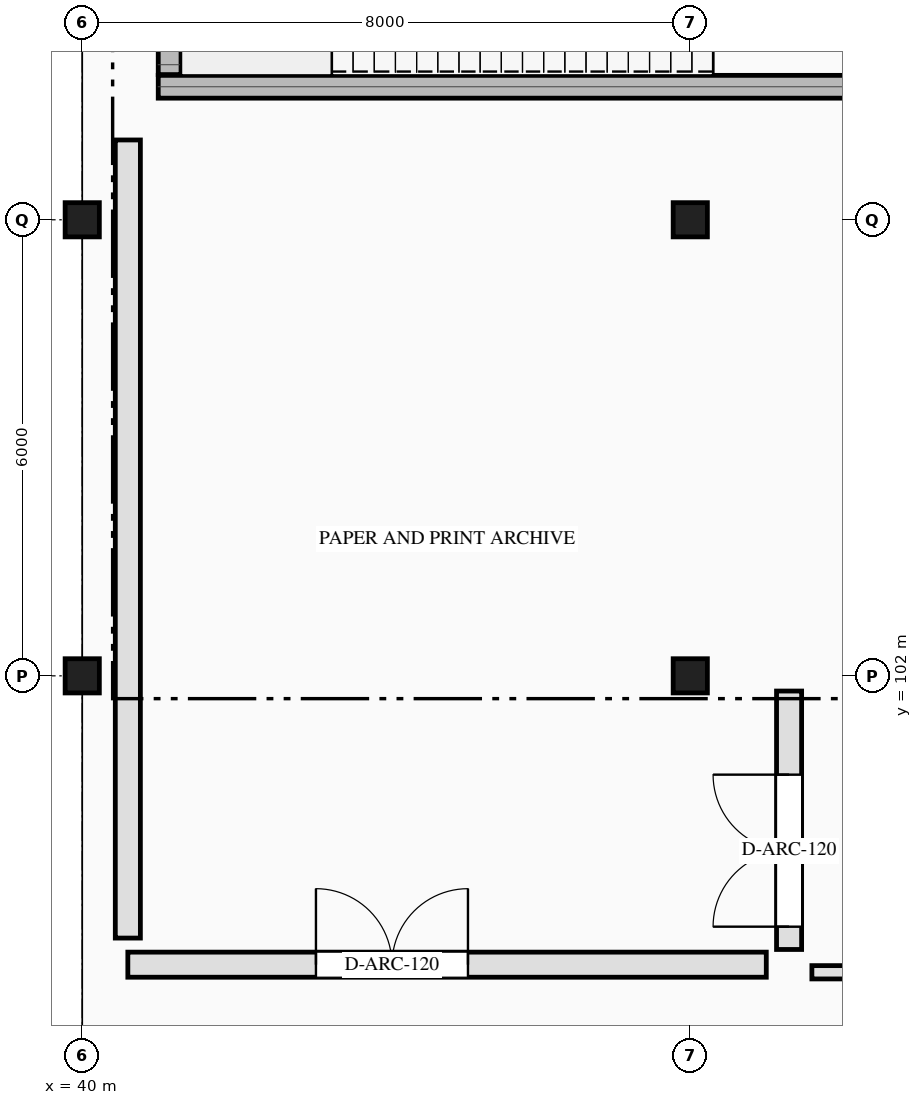
"""IFC4 building model, lengths in metres.
Left out: names, types, materials, properties, quantities, classifications, styles, units other than length and angle.
Written with IfcOpenShell. Run it as: python <this file> out.ifc"""

import sys

from ifc_helpers import new_model, si_unit, direction, frame, frame_2d, origin, origin_2d, place, context, subcontext, project, spatial, rectangle, extrude, element, fill, save


model = new_model("IFC4")
c1 = context("Model", 3, precision=1e-05, world=origin(), true_north=direction((0.0, 1.0)))
c2 = subcontext(c1, "Body", "Model", "MODEL_VIEW")
j1 = project(units=[si_unit("LENGTHUNIT", "METRE"), si_unit("PLANEANGLEUNIT", "RADIAN")], contexts=[c1])
p1 = place(None, origin())
s1 = spatial("IfcSite", under=j1, at=p1, CompositionType="ELEMENT")
p2 = place(p1, origin())
s2 = spatial("IfcBuilding", under=s1, at=p2, CompositionType="ELEMENT")
p3 = place(p2, frame((0.0, 0.0, -5.4)))
s3 = spatial("IfcBuildingStorey", under=s2, at=p3, CompositionType="ELEMENT", Elevation=-5.4)
p4 = place(p3, frame((41.0, 109.75, -0.4), z_axis=(0.0, 0.0, 1.0), x_axis=(1.0, 0.0, 0.0)))
e1 = element("IfcWall", 1, at=p4, inside=s3, PredefinedType="SHEAR", context=c2, shape_type="SweptSolid", body=[
    extrude(rectangle(XDim=10.0, YDim=0.3, at=frame_2d((5.0, 0.0))), origin(), (0.0, 0.0, 1.0), 5.8),
])
p5 = place(p3, frame((41.15, 109.91, -0.4), z_axis=(0.0, 0.0, 1.0), x_axis=(0.0, 1.0, 0.0)))
e2 = element("IfcWall", 2, at=p5, inside=s3, PredefinedType="SHEAR", context=c2, shape_type="SweptSolid", body=[
    extrude(rectangle(XDim=3.78, YDim=0.3, at=frame_2d((1.89, 0.0))), origin(), (0.0, 0.0, 1.0), 5.8),
])
for number, where, z_axis, x_axis in (
    (3, (40.0, 102.0, -0.4), (0.0, 0.0, 1.0), (1.0, 0.0, 0.0)),
    (4, (40.0, 108.0, -0.4), (0.0, 0.0, 1.0), (1.0, 0.0, 0.0)),
    (5, (48.0, 102.0, -0.4), (0.0, 0.0, 1.0), (1.0, 0.0, 0.0)),
    (6, (48.0, 108.0, -0.4), (0.0, 0.0, 1.0), (1.0, 0.0, 0.0)),
):
    element("IfcColumn", number, at=place(p3, frame(where, z_axis=z_axis, x_axis=x_axis)), inside=s3, PredefinedType="COLUMN", context=c2, shape_type="SweptSolid", body=[
        extrude(rectangle(XDim=0.45, YDim=0.45, at=origin_2d()), origin(), (0.0, 0.0, 1.0), 5.8),
    ])
p6 = place(p3, frame((49.6, 98.1, 0.0), z_axis=(0.0, 0.0, 1.0), x_axis=(1.0, 0.0, 0.0)))
e7 = element("IfcWall", 7, at=p6, inside=s3, PredefinedType="PARTITIONING", context=c2, shape_type="SweptSolid", body=[
    extrude(rectangle(XDim=5.9, YDim=0.175, at=frame_2d((2.95, 0.0))), origin(), (0.0, 0.0, 1.0), 5.16),
])
p7 = place(p6, frame((1.78, 0.0, 0.0)))
e8 = element("IfcOpeningElement", 8, at=p7, cuts=e7, PredefinedType="OPENING", context=c2, shape_type="SweptSolid", body=[
    extrude(rectangle(XDim=1.6, YDim=2.25, at=frame_2d((0.8, 1.125))), frame((0.0, 0.097, 0.0), z_axis=(0.0, -1.0, 0.0), x_axis=(1.0, 0.0, 0.0)), (0.0, 0.0, 1.0), 0.195),
])
p8 = place(p3, frame((49.3, 98.4, 0.0), z_axis=(0.0, 0.0, 1.0), x_axis=(0.0, 1.0, 0.0)))
e9 = element("IfcWall", 9, at=p8, inside=s3, PredefinedType="SOLIDWALL", context=c2, shape_type="SweptSolid", body=[
    extrude(rectangle(XDim=3.4, YDim=0.33, at=frame_2d((1.7, 0.0))), origin(), (0.0, 0.0, 1.0), 5.16),
])
p9 = place(p8, frame((0.3, 0.0, 0.0)))
e10 = element("IfcOpeningElement", 10, at=p9, cuts=e9, PredefinedType="OPENING", context=c2, shape_type="SweptSolid", body=[
    extrude(rectangle(XDim=2.0, YDim=2.5, at=frame_2d((1.0, 1.25))), frame((0.0, 0.175, 0.0), z_axis=(0.0, -1.0, 0.0), x_axis=(1.0, 0.0, 0.0)), (0.0, 0.0, 1.0), 0.35),
])
p10 = place(p3, frame((40.6, 98.2, 0.0), z_axis=(0.0, 0.0, 1.0), x_axis=(1.0, 0.0, 0.0)))
e11 = element("IfcWall", 11, at=p10, inside=s3, PredefinedType="SOLIDWALL", context=c2, shape_type="SweptSolid", body=[
    extrude(rectangle(XDim=8.4, YDim=0.33, at=frame_2d((4.2, 0.0))), origin(), (0.0, 0.0, 1.0), 5.16),
])
p11 = place(p10, frame((2.475, 0.0, 0.0)))
e12 = element("IfcOpeningElement", 12, at=p11, cuts=e11, PredefinedType="OPENING", context=c2, shape_type="SweptSolid", body=[
    extrude(rectangle(XDim=2.0, YDim=2.5, at=frame_2d((1.0, 1.25))), frame((0.0, 0.175, 0.0), z_axis=(0.0, -1.0, 0.0), x_axis=(1.0, 0.0, 0.0)), (0.0, 0.0, 1.0), 0.35),
])
p12 = place(p3, frame((40.6, 98.55, 0.0), z_axis=(0.0, 0.0, 1.0), x_axis=(0.0, 1.0, 0.0)))
e13 = element("IfcWall", 13, at=p12, inside=s3, PredefinedType="SOLIDWALL", context=c2, shape_type="SweptSolid", body=[
    extrude(rectangle(XDim=10.5, YDim=0.33, at=frame_2d((5.25, 0.0))), origin(), (0.0, 0.0, 1.0), 5.16),
])
p13 = place(p9, origin())
e14 = element("IfcDoor", 14, at=p13, inside=s3, OperationType="DOUBLE_DOOR_SINGLE_SWING", PredefinedType="DOOR", context=c2, shape_type="SweptSolid", body=[
    extrude(rectangle(XDim=2.0, YDim=2.5, at=frame_2d((1.0, 1.25))), frame((0.0, 0.025, 0.0), z_axis=(0.0, -1.0, 0.0), x_axis=(1.0, 0.0, 0.0)), (0.0, 0.0, 1.0), 0.05),
])
fill(e10, e14)
p14 = place(p11, origin())
e15 = element("IfcDoor", 15, at=p14, inside=s3, OperationType="DOUBLE_DOOR_SINGLE_SWING", PredefinedType="DOOR", context=c2, shape_type="SweptSolid", body=[
    extrude(rectangle(XDim=2.0, YDim=2.5, at=frame_2d((1.0, 1.25))), frame((0.0, 0.025, 0.0), z_axis=(0.0, -1.0, 0.0), x_axis=(1.0, 0.0, 0.0)), (0.0, 0.0, 1.0), 0.05),
])
fill(e12, e15)
save(model, sys.argv[1])
